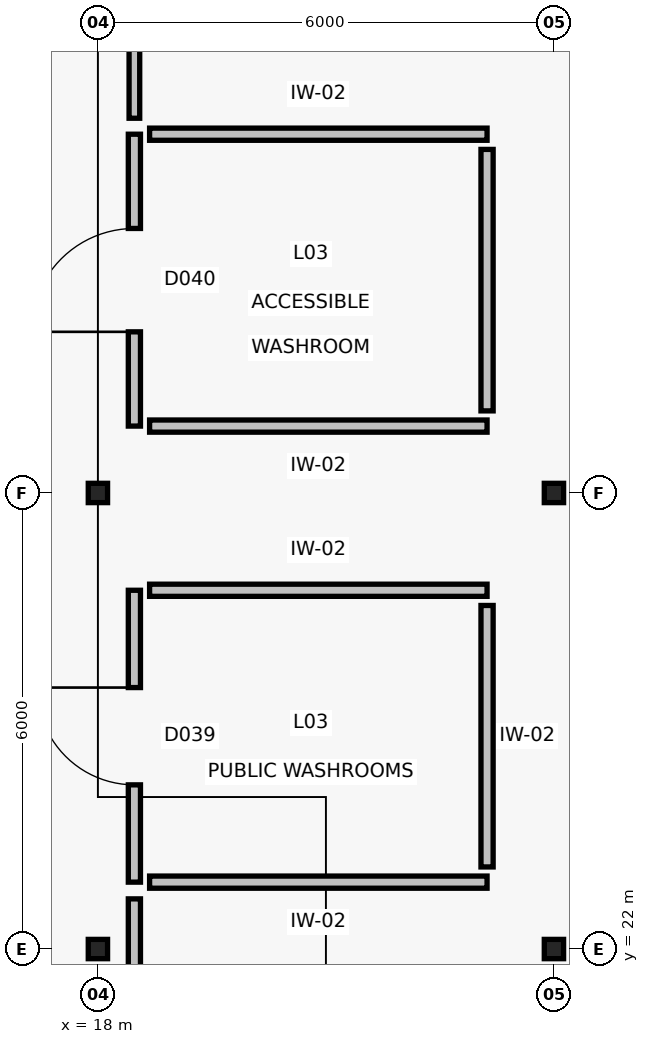
"""IFC4 building model, lengths in metres.
Left out: names, types, materials, properties, quantities, classifications, styles, units other than length and angle.
Written with IfcOpenShell. Run it as: python <this file> out.ifc"""

import sys

from ifc_helpers import new_model, si_unit, direction, frame, frame_2d, origin, origin_2d, place, context, subcontext, project, spatial, rectangle, hollow_rectangle, extrude, element, fill, save


model = new_model("IFC4")
c1 = context("Model", 3, precision=1e-05, world=origin(), true_north=direction((0.0, 1.0)))
c2 = subcontext(c1, "Body", "Model", "MODEL_VIEW")
j1 = project(units=[si_unit("LENGTHUNIT", "METRE"), si_unit("PLANEANGLEUNIT", "RADIAN")], contexts=[c1])
p1 = place(None, origin())
s1 = spatial("IfcSite", under=j1, at=p1, CompositionType="ELEMENT")
p2 = place(p1, origin())
s2 = spatial("IfcBuilding", under=s1, at=p2, CompositionType="ELEMENT")
p3 = place(p2, frame((0.0, 0.0, 11.4)))
s3 = spatial("IfcBuildingStorey", under=s2, at=p3, CompositionType="ELEMENT", Elevation=11.4)
for number, where, z_axis, x_axis in (
    (1, (18.0, 22.0, 0.0), (0.0, 0.0, 1.0), (1.0, 0.0, 0.0)),
    (2, (18.0, 28.0, 0.0), (0.0, 0.0, 1.0), (1.0, 0.0, 0.0)),
    (3, (24.0, 22.0, 0.0), (0.0, 0.0, 1.0), (1.0, 0.0, 0.0)),
    (4, (24.0, 28.0, 0.0), (0.0, 0.0, 1.0), (1.0, 0.0, 0.0)),
):
    element("IfcColumn", number, at=place(p3, frame(where, z_axis=z_axis, x_axis=x_axis)), inside=s3, PredefinedType="COLUMN", context=c2, shape_type="SweptSolid", body=[
        extrude(hollow_rectangle(XDim=0.254, YDim=0.254, WallThickness=0.01, InnerFilletRadius=0.01, OuterFilletRadius=0.019, at=origin_2d()), origin(), (0.0, 0.0, 1.0), 4.0),
    ])
p4 = place(p3, frame((18.48, 22.88, 0.0), z_axis=(0.0, 0.0, 1.0), x_axis=(0.0, 1.0, 0.0)))
e5 = element("IfcWall", 5, at=p4, inside=s3, PredefinedType="PARTITIONING", context=c2, shape_type="SweptSolid", body=[
    extrude(rectangle(XDim=3.84, YDim=0.16, at=frame_2d((1.92, 0.0))), origin(), (0.0, 0.0, 1.0), 3.68),
])
p5 = place(p4, frame((1.28, 0.0, 0.0)))
e6 = element("IfcOpeningElement", 6, at=p5, cuts=e5, PredefinedType="OPENING", context=c2, shape_type="SweptSolid", body=[
    extrude(rectangle(XDim=1.28, YDim=2.2, at=frame_2d((0.64, 1.1))), frame((0.0, 0.095, 0.0), z_axis=(0.0, -1.0, 0.0), x_axis=(1.0, 0.0, 0.0)), (0.0, 0.0, 1.0), 0.19),
])
for number, where, z_axis, x_axis in (
    (7, (18.68, 26.72, 0.0), (0.0, 0.0, 1.0), (1.0, 0.0, 0.0)),
    (8, (23.12, 22.88, 0.0), (0.0, 0.0, 1.0), (-1.0, 0.0, 0.0)),
):
    element("IfcWall", number, at=place(p3, frame(where, z_axis=z_axis, x_axis=x_axis)), inside=s3, PredefinedType="PARTITIONING", context=c2, shape_type="SweptSolid", body=[
        extrude(rectangle(XDim=4.44, YDim=0.16, at=frame_2d((2.22, 0.0))), origin(), (0.0, 0.0, 1.0), 3.447),
    ])
p6 = place(p3, frame((23.12, 26.52, 0.0), z_axis=(0.0, 0.0, 1.0), x_axis=(0.0, -1.0, 0.0)))
e9 = element("IfcWall", 9, at=p6, inside=s3, PredefinedType="PARTITIONING", context=c2, shape_type="SweptSolid", body=[
    extrude(rectangle(XDim=3.44, YDim=0.16, at=frame_2d((1.72, 0.0))), origin(), (0.0, 0.0, 1.0), 3.68),
])
p7 = place(p3, frame((18.48, 28.88, 0.0), z_axis=(0.0, 0.0, 1.0), x_axis=(0.0, 1.0, 0.0)))
e10 = element("IfcWall", 10, at=p7, inside=s3, PredefinedType="PARTITIONING", context=c2, shape_type="SweptSolid", body=[
    extrude(rectangle(XDim=3.84, YDim=0.16, at=frame_2d((1.92, 0.0))), origin(), (0.0, 0.0, 1.0), 3.68),
])
p8 = place(p7, frame((1.24, 0.0, 0.0)))
e11 = element("IfcOpeningElement", 11, at=p8, cuts=e10, PredefinedType="OPENING", context=c2, shape_type="SweptSolid", body=[
    extrude(rectangle(XDim=1.36, YDim=2.2, at=frame_2d((0.68, 1.1))), frame((0.0, 0.095, 0.0), z_axis=(0.0, -1.0, 0.0), x_axis=(1.0, 0.0, 0.0)), (0.0, 0.0, 1.0), 0.19),
])
for number, where, z_axis, x_axis in (
    (12, (18.68, 32.72, 0.0), (0.0, 0.0, 1.0), (1.0, 0.0, 0.0)),
    (13, (23.12, 28.88, 0.0), (0.0, 0.0, 1.0), (-1.0, 0.0, 0.0)),
):
    element("IfcWall", number, at=place(p3, frame(where, z_axis=z_axis, x_axis=x_axis)), inside=s3, PredefinedType="PARTITIONING", context=c2, shape_type="SweptSolid", body=[
        extrude(rectangle(XDim=4.44, YDim=0.16, at=frame_2d((2.22, 0.0))), origin(), (0.0, 0.0, 1.0), 3.403),
    ])
p9 = place(p3, frame((23.12, 32.52, 0.0), z_axis=(0.0, 0.0, 1.0), x_axis=(0.0, -1.0, 0.0)))
e14 = element("IfcWall", 14, at=p9, inside=s3, PredefinedType="PARTITIONING", context=c2, shape_type="SweptSolid", body=[
    extrude(rectangle(XDim=3.44, YDim=0.16, at=frame_2d((1.72, 0.0))), origin(), (0.0, 0.0, 1.0), 3.68),
])
p10 = place(p3, frame((18.48, 0.68, 0.0), z_axis=(0.0, 0.0, 1.0), x_axis=(0.0, 1.0, 0.0)))
e15 = element("IfcWall", 15, at=p10, inside=s3, PredefinedType="PARTITIONING", context=c2, shape_type="SweptSolid", body=[
    extrude(rectangle(XDim=21.98, YDim=0.16, at=frame_2d((10.99, 0.0))), origin(), (0.0, 0.0, 1.0), 3.111),
])
p11 = place(p10, frame((7.371, 0.0, 0.0)))
e16 = element("IfcOpeningElement", 16, at=p11, cuts=e15, PredefinedType="OPENING", context=c2, shape_type="SweptSolid", body=[
    extrude(rectangle(XDim=0.92, YDim=2.1, at=frame_2d((0.46, 1.05))), frame((0.0, 0.095, 0.0), z_axis=(0.0, -1.0, 0.0), x_axis=(1.0, 0.0, 0.0)), (0.0, 0.0, 1.0), 0.19),
])
p12 = place(p3, frame((18.48, 32.93, 0.0), z_axis=(0.0, 0.0, 1.0), x_axis=(0.0, 1.0, 0.0)))
e17 = element("IfcWall", 17, at=p12, inside=s3, PredefinedType="PARTITIONING", context=c2, shape_type="SweptSolid", body=[
    extrude(rectangle(XDim=26.864, YDim=0.14, at=frame_2d((13.432, 0.0))), origin(), (0.0, 0.0, 1.0), 3.187),
])
p13 = place(p12, frame((12.952, 0.0, 0.0)))
e18 = element("IfcOpeningElement", 18, at=p13, cuts=e17, PredefinedType="OPENING", context=c2, shape_type="SweptSolid", body=[
    extrude(rectangle(XDim=0.96, YDim=2.1, at=frame_2d((0.48, 1.05))), frame((0.0, 0.085, 0.0), z_axis=(0.0, -1.0, 0.0), x_axis=(1.0, 0.0, 0.0)), (0.0, 0.0, 1.0), 0.17),
])
p14 = place(p5, origin())
e19 = element("IfcDoor", 19, at=p14, inside=s3, OperationType="SINGLE_SWING_RIGHT", PredefinedType="DOOR", context=c2, shape_type="SweptSolid", body=[
    extrude(rectangle(XDim=1.28, YDim=2.2, at=frame_2d((0.64, 1.1))), frame((0.0, 0.025, 0.0), z_axis=(0.0, -1.0, 0.0), x_axis=(1.0, 0.0, 0.0)), (0.0, 0.0, 1.0), 0.05),
])
fill(e6, e19)
p15 = place(p8, origin())
e20 = element("IfcDoor", 20, at=p15, inside=s3, OperationType="SINGLE_SWING_LEFT", PredefinedType="DOOR", context=c2, shape_type="SweptSolid", body=[
    extrude(rectangle(XDim=1.36, YDim=2.2, at=frame_2d((0.68, 1.1))), frame((0.0, 0.025, 0.0), z_axis=(0.0, -1.0, 0.0), x_axis=(1.0, 0.0, 0.0)), (0.0, 0.0, 1.0), 0.05),
])
fill(e11, e20)
save(model, sys.argv[1])
